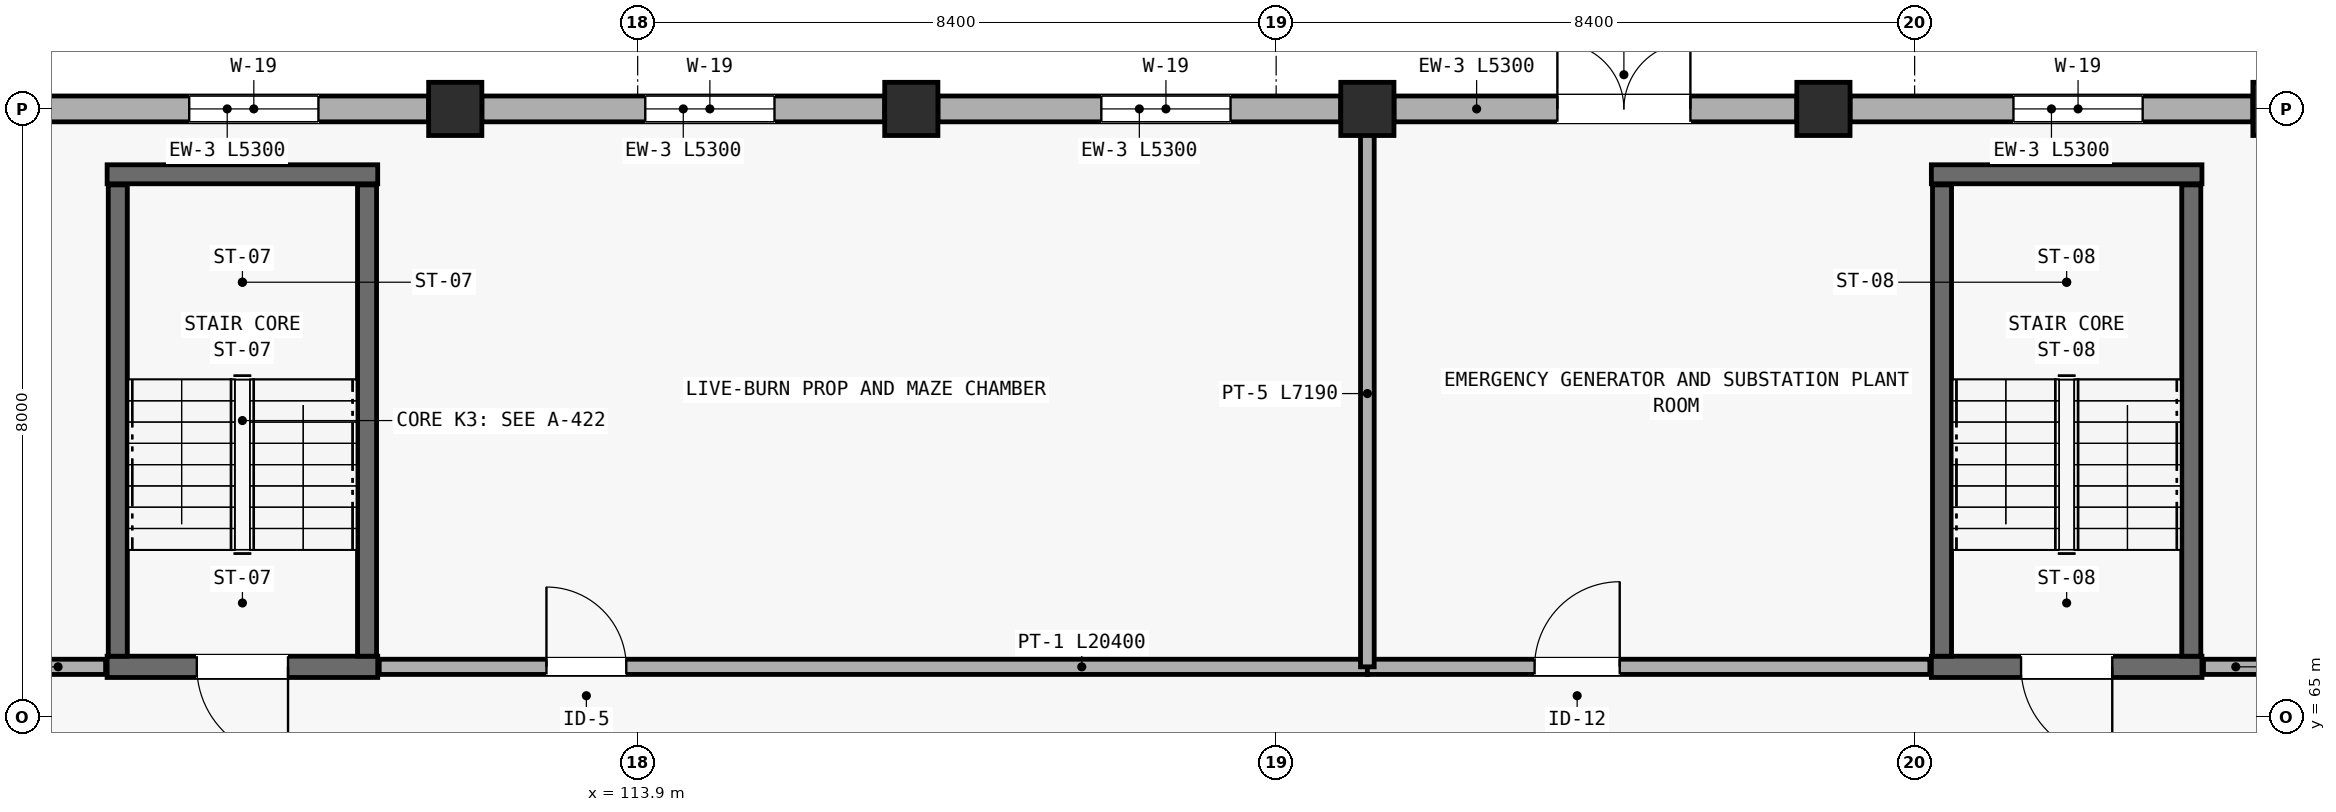
"""IFC4 building model, lengths in metres.
Left out: names, types, materials, properties, quantities, classifications, styles, units other than length and angle.
Written with IfcOpenShell. Run it as: python <this file> out.ifc"""

import sys

from ifc_helpers import new_model, si_unit, direction, frame, frame_2d, origin, origin_2d, place, context, subcontext, project, spatial, rectangle, extrude, element, fill, save


model = new_model("IFC4")
c1 = context("Model", 3, precision=1e-05, world=origin(), true_north=direction((0.0, 1.0)))
c2 = subcontext(c1, "Body", "Model", "MODEL_VIEW")
j1 = project(units=[si_unit("LENGTHUNIT", "METRE"), si_unit("PLANEANGLEUNIT", "RADIAN")], contexts=[c1])
p1 = place(None, origin())
s1 = spatial("IfcSite", under=j1, at=p1, CompositionType="ELEMENT")
p2 = place(p1, origin())
s2 = spatial("IfcBuilding", under=s1, at=p2, CompositionType="ELEMENT")
p3 = place(p2, origin())
s3 = spatial("IfcBuildingStorey", under=s2, at=p3, CompositionType="ELEMENT", Elevation=0.0)
for number, where, z_axis, x_axis in (
    (1, (111.5, 73.0, 0.0), (0.0, 0.0, 1.0), (1.0, 0.0, 0.0)),
    (2, (117.5, 73.0, 0.0), (0.0, 0.0, 1.0), (1.0, 0.0, 0.0)),
    (3, (123.5, 73.0, 0.0), (0.0, 0.0, 1.0), (1.0, 0.0, 0.0)),
    (4, (129.5, 73.0, 0.0), (0.0, 0.0, 1.0), (1.0, 0.0, 0.0)),
    (5, (135.5, 73.0, 0.0), (0.0, 0.0, 1.0), (1.0, 0.0, 0.0)),
):
    element("IfcColumn", number, at=place(p3, frame(where, z_axis=z_axis, x_axis=x_axis)), inside=s3, PredefinedType="COLUMN", context=c2, shape_type="SweptSolid", body=[
        extrude(rectangle(XDim=0.7, YDim=0.7, at=origin_2d()), origin(), (0.0, 0.0, 1.0), 5.85),
    ])
p4 = place(p3, frame((111.15, 73.0, 0.0), z_axis=(0.0, 0.0, 1.0), x_axis=(-1.0, 0.0, 0.0)))
e6 = element("IfcWall", 6, at=p4, inside=s3, PredefinedType="STANDARD", context=c2, shape_type="SweptSolid", body=[
    extrude(rectangle(XDim=5.3, YDim=0.34, at=frame_2d((2.65, 0.0))), origin(), (0.0, 0.0, 1.0), 4.678),
])
p5 = place(p4, frame((1.45, 0.0, 0.85)))
e7 = element("IfcOpeningElement", 7, at=p5, cuts=e6, PredefinedType="OPENING", context=c2, shape_type="SweptSolid", body=[
    extrude(rectangle(XDim=1.7, YDim=1.35, at=frame_2d((0.85, 0.675))), frame((0.0, 0.18, 0.0), z_axis=(0.0, -1.0, 0.0), x_axis=(1.0, 0.0, 0.0)), (0.0, 0.0, 1.0), 0.36),
])
p6 = place(p3, frame((117.15, 73.0, 0.0), z_axis=(0.0, 0.0, 1.0), x_axis=(-1.0, 0.0, 0.0)))
e8 = element("IfcWall", 8, at=p6, inside=s3, PredefinedType="STANDARD", context=c2, shape_type="SweptSolid", body=[
    extrude(rectangle(XDim=5.3, YDim=0.34, at=frame_2d((2.65, 0.0))), origin(), (0.0, 0.0, 1.0), 4.678),
])
p7 = place(p6, frame((1.45, 0.0, 0.85)))
e9 = element("IfcOpeningElement", 9, at=p7, cuts=e8, PredefinedType="OPENING", context=c2, shape_type="SweptSolid", body=[
    extrude(rectangle(XDim=1.7, YDim=1.35, at=frame_2d((0.85, 0.675))), frame((0.0, 0.18, 0.0), z_axis=(0.0, -1.0, 0.0), x_axis=(1.0, 0.0, 0.0)), (0.0, 0.0, 1.0), 0.36),
])
p8 = place(p3, frame((123.15, 73.0, 0.0), z_axis=(0.0, 0.0, 1.0), x_axis=(-1.0, 0.0, 0.0)))
e10 = element("IfcWall", 10, at=p8, inside=s3, PredefinedType="STANDARD", context=c2, shape_type="SweptSolid", body=[
    extrude(rectangle(XDim=5.3, YDim=0.34, at=frame_2d((2.65, 0.0))), origin(), (0.0, 0.0, 1.0), 4.678),
])
p9 = place(p8, frame((1.45, 0.0, 0.85)))
e11 = element("IfcOpeningElement", 11, at=p9, cuts=e10, PredefinedType="OPENING", context=c2, shape_type="SweptSolid", body=[
    extrude(rectangle(XDim=1.7, YDim=1.35, at=frame_2d((0.85, 0.675))), frame((0.0, 0.18, 0.0), z_axis=(0.0, -1.0, 0.0), x_axis=(1.0, 0.0, 0.0)), (0.0, 0.0, 1.0), 0.36),
])
p10 = place(p3, frame((129.15, 73.0, 0.0), z_axis=(0.0, 0.0, 1.0), x_axis=(-1.0, 0.0, 0.0)))
e12 = element("IfcWall", 12, at=p10, inside=s3, PredefinedType="STANDARD", context=c2, shape_type="SweptSolid", body=[
    extrude(rectangle(XDim=5.3, YDim=0.34, at=frame_2d((2.65, 0.0))), origin(), (0.0, 0.0, 1.0), 4.678),
])
p11 = place(p10, frame((1.4, 0.0, 0.0)))
e13 = element("IfcOpeningElement", 13, at=p11, cuts=e12, PredefinedType="OPENING", context=c2, shape_type="SweptSolid", body=[
    extrude(rectangle(XDim=1.75, YDim=2.2, at=frame_2d((0.875, 1.1))), frame((0.0, 0.18, 0.0), z_axis=(0.0, -1.0, 0.0), x_axis=(1.0, 0.0, 0.0)), (0.0, 0.0, 1.0), 0.36),
])
p12 = place(p3, frame((135.15, 73.0, 0.0), z_axis=(0.0, 0.0, 1.0), x_axis=(-1.0, 0.0, 0.0)))
e14 = element("IfcWall", 14, at=p12, inside=s3, PredefinedType="STANDARD", context=c2, shape_type="SweptSolid", body=[
    extrude(rectangle(XDim=5.3, YDim=0.34, at=frame_2d((2.65, 0.0))), origin(), (0.0, 0.0, 1.0), 4.678),
])
p13 = place(p12, frame((1.45, 0.0, 0.85)))
e15 = element("IfcOpeningElement", 15, at=p13, cuts=e14, PredefinedType="OPENING", context=c2, shape_type="SweptSolid", body=[
    extrude(rectangle(XDim=1.7, YDim=1.35, at=frame_2d((0.85, 0.675))), frame((0.0, 0.18, 0.0), z_axis=(0.0, -1.0, 0.0), x_axis=(1.0, 0.0, 0.0)), (0.0, 0.0, 1.0), 0.36),
])
p14 = place(p3, frame((110.48, 65.66, 0.0), z_axis=(0.0, 0.0, 1.0), x_axis=(-1.0, 0.0, 0.0)))
e16 = element("IfcWall", 16, at=p14, inside=s3, PredefinedType="SHEAR", context=c2, shape_type="SweptSolid", body=[
    extrude(rectangle(XDim=3.56, YDim=0.28, at=frame_2d((1.78, 0.0))), origin(), (0.0, 0.0, 1.0), 5.6),
])
p15 = place(p14, frame((1.18, 0.0, 0.0)))
e17 = element("IfcOpeningElement", 17, at=p15, cuts=e16, PredefinedType="OPENING", context=c2, shape_type="SweptSolid", body=[
    extrude(rectangle(XDim=1.2, YDim=2.15, at=frame_2d((0.6, 1.075))), frame((0.0, 0.15, 0.0), z_axis=(0.0, -1.0, 0.0), x_axis=(1.0, 0.0, 0.0)), (0.0, 0.0, 1.0), 0.3),
])
p16 = place(p3, frame((106.92, 72.14, 0.0), z_axis=(0.0, 0.0, 1.0), x_axis=(1.0, 0.0, 0.0)))
e18 = element("IfcWall", 18, at=p16, inside=s3, PredefinedType="SHEAR", context=c2, shape_type="SweptSolid", body=[
    extrude(rectangle(XDim=3.56, YDim=0.25, at=frame_2d((1.78, 0.0))), origin(), (0.0, 0.0, 1.0), 5.6),
])
for number, where, z_axis, x_axis in (
    (19, (110.34, 65.8, 0.0), (0.0, 0.0, 1.0), (0.0, 1.0, 0.0)),
    (20, (107.06, 72.0, 0.0), (0.0, 0.0, 1.0), (0.0, -1.0, 0.0)),
):
    element("IfcWall", number, at=place(p3, frame(where, z_axis=z_axis, x_axis=x_axis)), inside=s3, PredefinedType="SHEAR", context=c2, shape_type="SweptSolid", body=[
        extrude(rectangle(XDim=6.2, YDim=0.25, at=frame_2d((3.1, 0.0))), origin(), (0.0, 0.0, 1.0), 5.6),
    ])
p17 = place(p3, frame((134.48, 65.66, 0.0), z_axis=(0.0, 0.0, 1.0), x_axis=(-1.0, 0.0, 0.0)))
e21 = element("IfcWall", 21, at=p17, inside=s3, PredefinedType="SHEAR", context=c2, shape_type="SweptSolid", body=[
    extrude(rectangle(XDim=3.56, YDim=0.28, at=frame_2d((1.78, 0.0))), origin(), (0.0, 0.0, 1.0), 5.6),
])
p18 = place(p17, frame((1.18, 0.0, 0.0)))
e22 = element("IfcOpeningElement", 22, at=p18, cuts=e21, PredefinedType="OPENING", context=c2, shape_type="SweptSolid", body=[
    extrude(rectangle(XDim=1.2, YDim=2.15, at=frame_2d((0.6, 1.075))), frame((0.0, 0.15, 0.0), z_axis=(0.0, -1.0, 0.0), x_axis=(1.0, 0.0, 0.0)), (0.0, 0.0, 1.0), 0.3),
])
p19 = place(p3, frame((130.92, 72.14, 0.0), z_axis=(0.0, 0.0, 1.0), x_axis=(1.0, 0.0, 0.0)))
e23 = element("IfcWall", 23, at=p19, inside=s3, PredefinedType="SHEAR", context=c2, shape_type="SweptSolid", body=[
    extrude(rectangle(XDim=3.56, YDim=0.25, at=frame_2d((1.78, 0.0))), origin(), (0.0, 0.0, 1.0), 5.6),
])
for number, where, z_axis, x_axis in (
    (24, (134.34, 65.8, 0.0), (0.0, 0.0, 1.0), (0.0, 1.0, 0.0)),
    (25, (131.06, 72.0, 0.0), (0.0, 0.0, 1.0), (0.0, -1.0, 0.0)),
):
    element("IfcWall", number, at=place(p3, frame(where, z_axis=z_axis, x_axis=x_axis)), inside=s3, PredefinedType="SHEAR", context=c2, shape_type="SweptSolid", body=[
        extrude(rectangle(XDim=6.2, YDim=0.25, at=frame_2d((3.1, 0.0))), origin(), (0.0, 0.0, 1.0), 5.6),
    ])
p20 = place(p3, frame((105.65, 65.66, 0.0), z_axis=(0.0, 0.0, 1.0), x_axis=(1.0, 0.0, 0.0)))
e26 = element("IfcWall", 26, at=p20, inside=s3, PredefinedType="PARTITIONING", context=c2, shape_type="SweptSolid", body=[
    extrude(rectangle(XDim=1.25, YDim=0.2, at=frame_2d((0.625, 0.0))), origin(), (0.0, 0.0, 1.0), 5.0),
])
p21 = place(p3, frame((110.5, 65.66, 0.0), z_axis=(0.0, 0.0, 1.0), x_axis=(1.0, 0.0, 0.0)))
e27 = element("IfcWall", 27, at=p21, inside=s3, PredefinedType="PARTITIONING", context=c2, shape_type="SweptSolid", body=[
    extrude(rectangle(XDim=13.0, YDim=0.2, at=frame_2d((6.5, 0.0))), origin(), (0.0, 0.0, 1.0), 5.0),
])
p22 = place(p21, frame((2.2, 0.0, 0.0)))
e28 = element("IfcOpeningElement", 28, at=p22, cuts=e27, PredefinedType="OPENING", context=c2, shape_type="SweptSolid", body=[
    extrude(rectangle(XDim=1.05, YDim=2.14, at=frame_2d((0.525, 1.07))), frame((0.0, 0.11, 0.0), z_axis=(0.0, -1.0, 0.0), x_axis=(1.0, 0.0, 0.0)), (0.0, 0.0, 1.0), 0.22),
])
p23 = place(p3, frame((123.5, 65.66, 0.0), z_axis=(0.0, 0.0, 1.0), x_axis=(1.0, 0.0, 0.0)))
e29 = element("IfcWall", 29, at=p23, inside=s3, PredefinedType="PARTITIONING", context=c2, shape_type="SweptSolid", body=[
    extrude(rectangle(XDim=7.4, YDim=0.2, at=frame_2d((3.7, 0.0))), origin(), (0.0, 0.0, 1.0), 5.0),
])
p24 = place(p23, frame((2.2, 0.0, 0.0)))
e30 = element("IfcOpeningElement", 30, at=p24, cuts=e29, PredefinedType="OPENING", context=c2, shape_type="SweptSolid", body=[
    extrude(rectangle(XDim=1.12, YDim=2.15, at=frame_2d((0.56, 1.075))), frame((0.0, 0.11, 0.0), z_axis=(0.0, -1.0, 0.0), x_axis=(1.0, 0.0, 0.0)), (0.0, 0.0, 1.0), 0.22),
])
p25 = place(p3, frame((134.5, 65.66, 0.0), z_axis=(0.0, 0.0, 1.0), x_axis=(1.0, 0.0, 0.0)))
e31 = element("IfcWall", 31, at=p25, inside=s3, PredefinedType="PARTITIONING", context=c2, shape_type="SweptSolid", body=[
    extrude(rectangle(XDim=0.85, YDim=0.2, at=frame_2d((0.425, 0.0))), origin(), (0.0, 0.0, 1.0), 5.0),
])
p26 = place(p3, frame((123.5, 65.66, 0.0), z_axis=(0.0, 0.0, 1.0), x_axis=(0.0, 1.0, 0.0)))
e32 = element("IfcWall", 32, at=p26, inside=s3, PredefinedType="PARTITIONING", context=c2, shape_type="SweptSolid", body=[
    extrude(rectangle(XDim=7.19, YDim=0.18, at=frame_2d((3.595, 0.0))), origin(), (0.0, 0.0, 1.0), 4.749),
])
p27 = place(p5, origin())
e33 = element("IfcWindow", 33, at=p27, inside=s3, PartitioningType="DOUBLE_PANEL_HORIZONTAL", PredefinedType="WINDOW", context=c2, shape_type="SweptSolid", body=[
    extrude(rectangle(XDim=1.7, YDim=1.35, at=frame_2d((0.85, 0.675))), frame((0.0, 0.03, 0.0), z_axis=(0.0, -1.0, 0.0), x_axis=(1.0, 0.0, 0.0)), (0.0, 0.0, 1.0), 0.06),
])
fill(e7, e33)
p28 = place(p7, origin())
e34 = element("IfcWindow", 34, at=p28, inside=s3, PartitioningType="DOUBLE_PANEL_HORIZONTAL", PredefinedType="WINDOW", context=c2, shape_type="SweptSolid", body=[
    extrude(rectangle(XDim=1.7, YDim=1.35, at=frame_2d((0.85, 0.675))), frame((0.0, 0.03, 0.0), z_axis=(0.0, -1.0, 0.0), x_axis=(1.0, 0.0, 0.0)), (0.0, 0.0, 1.0), 0.06),
])
fill(e9, e34)
p29 = place(p9, origin())
e35 = element("IfcWindow", 35, at=p29, inside=s3, PartitioningType="DOUBLE_PANEL_HORIZONTAL", PredefinedType="WINDOW", context=c2, shape_type="SweptSolid", body=[
    extrude(rectangle(XDim=1.7, YDim=1.35, at=frame_2d((0.85, 0.675))), frame((0.0, 0.03, 0.0), z_axis=(0.0, -1.0, 0.0), x_axis=(1.0, 0.0, 0.0)), (0.0, 0.0, 1.0), 0.06),
])
fill(e11, e35)
p30 = place(p11, frame((1.75, 0.0, 0.0), z_axis=(0.0, 0.0, 1.0), x_axis=(-1.0, 0.0, 0.0)))
e36 = element("IfcDoor", 36, at=p30, inside=s3, OperationType="DOUBLE_DOOR_SINGLE_SWING", PredefinedType="DOOR", context=c2, shape_type="SweptSolid", body=[
    extrude(rectangle(XDim=1.75, YDim=2.2, at=frame_2d((0.875, 1.1))), frame((0.0, 0.025, 0.0), z_axis=(0.0, -1.0, 0.0), x_axis=(1.0, 0.0, 0.0)), (0.0, 0.0, 1.0), 0.05),
])
fill(e13, e36)
p31 = place(p13, origin())
e37 = element("IfcWindow", 37, at=p31, inside=s3, PartitioningType="DOUBLE_PANEL_HORIZONTAL", PredefinedType="WINDOW", context=c2, shape_type="SweptSolid", body=[
    extrude(rectangle(XDim=1.7, YDim=1.35, at=frame_2d((0.85, 0.675))), frame((0.0, 0.03, 0.0), z_axis=(0.0, -1.0, 0.0), x_axis=(1.0, 0.0, 0.0)), (0.0, 0.0, 1.0), 0.06),
])
fill(e15, e37)
p32 = place(p15, origin())
e38 = element("IfcDoor", 38, at=p32, inside=s3, OperationType="SINGLE_SWING_LEFT", PredefinedType="DOOR", context=c2, shape_type="SweptSolid", body=[
    extrude(rectangle(XDim=1.2, YDim=2.15, at=frame_2d((0.6, 1.075))), frame((0.0, 0.025, 0.0), z_axis=(0.0, -1.0, 0.0), x_axis=(1.0, 0.0, 0.0)), (0.0, 0.0, 1.0), 0.05),
])
fill(e17, e38)
p33 = place(p18, origin())
e39 = element("IfcDoor", 39, at=p33, inside=s3, OperationType="SINGLE_SWING_LEFT", PredefinedType="DOOR", context=c2, shape_type="SweptSolid", body=[
    extrude(rectangle(XDim=1.2, YDim=2.15, at=frame_2d((0.6, 1.075))), frame((0.0, 0.025, 0.0), z_axis=(0.0, -1.0, 0.0), x_axis=(1.0, 0.0, 0.0)), (0.0, 0.0, 1.0), 0.05),
])
fill(e22, e39)
p34 = place(p22, origin())
e40 = element("IfcDoor", 40, at=p34, inside=s3, OperationType="SINGLE_SWING_LEFT", PredefinedType="DOOR", context=c2, shape_type="SweptSolid", body=[
    extrude(rectangle(XDim=1.05, YDim=2.14, at=frame_2d((0.525, 1.07))), frame((0.0, 0.025, 0.0), z_axis=(0.0, -1.0, 0.0), x_axis=(1.0, 0.0, 0.0)), (0.0, 0.0, 1.0), 0.05),
])
fill(e28, e40)
p35 = place(p24, origin())
e41 = element("IfcDoor", 41, at=p35, inside=s3, OperationType="SINGLE_SWING_RIGHT", PredefinedType="DOOR", context=c2, shape_type="SweptSolid", body=[
    extrude(rectangle(XDim=1.12, YDim=2.15, at=frame_2d((0.56, 1.075))), frame((0.0, 0.025, 0.0), z_axis=(0.0, -1.0, 0.0), x_axis=(1.0, 0.0, 0.0)), (0.0, 0.0, 1.0), 0.05),
])
fill(e30, e41)
save(model, sys.argv[1])
